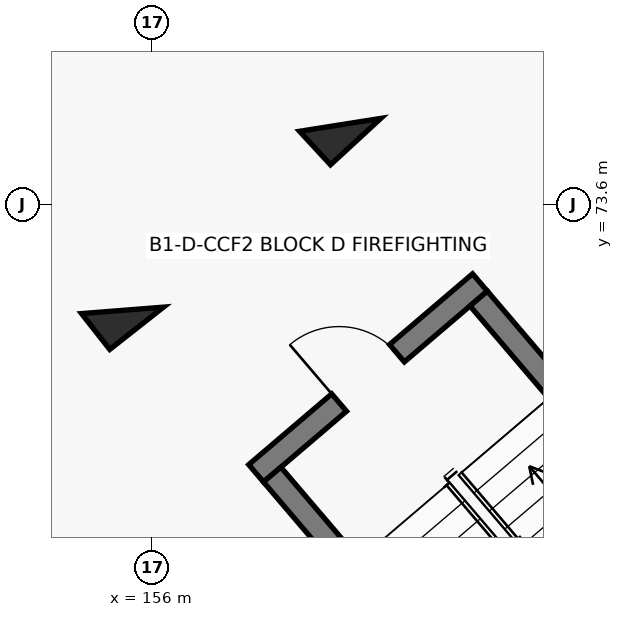
"""IFC4 building model, lengths in metres.
Left out: names, types, materials, properties, quantities, classifications, styles, units other than length and angle.
Written with IfcOpenShell. Run it as: python <this file> out.ifc"""

import sys

from ifc_helpers import new_model, si_unit, direction, frame, frame_2d, origin, origin_2d, place, context, subcontext, project, spatial, rectangle, extrude, element, fill, save


model = new_model("IFC4")
c1 = context("Model", 3, precision=1e-05, world=origin(), true_north=direction((0.0, 1.0)))
c2 = subcontext(c1, "Body", "Model", "MODEL_VIEW")
j1 = project(units=[si_unit("LENGTHUNIT", "METRE"), si_unit("PLANEANGLEUNIT", "RADIAN")], contexts=[c1])
p1 = place(None, origin())
s1 = spatial("IfcSite", under=j1, at=p1, CompositionType="ELEMENT")
p2 = place(p1, origin())
s2 = spatial("IfcBuilding", under=s1, at=p2, CompositionType="ELEMENT")
p3 = place(p2, frame((0.0, 0.0, -3.6)))
s3 = spatial("IfcBuildingStorey", under=s2, at=p3, CompositionType="ELEMENT", Elevation=-3.6)
for number, where, z_axis, x_axis in (
    (1, (155.614, 72.202, 0.0), (0.0, 0.0, 1.0), (0.618, -0.786, 0.0)),
    (2, (158.477, 74.643, 0.0), (0.0, 0.0, 1.0), (0.678, -0.735, 0.0)),
):
    element("IfcColumn", number, at=place(p3, frame(where, z_axis=z_axis, x_axis=x_axis)), inside=s3, PredefinedType="COLUMN", context=c2, shape_type="SweptSolid", body=[
        extrude(rectangle(XDim=0.6, YDim=0.9, at=origin_2d()), origin(), (0.0, 0.0, 1.0), 3.6),
    ])
p4 = place(p3, frame((157.372, 70.058, 0.0), z_axis=(0.0, 0.0, 1.0), x_axis=(0.760990583254, 0.648762924495, 0.0)))
e3 = element("IfcWall", 3, at=p4, inside=s3, PredefinedType="SHEAR", context=c2, shape_type="SweptSolid", body=[
    extrude(rectangle(XDim=3.87, YDim=0.3, at=frame_2d((1.935, 0.0))), origin(), (0.0, 0.0, 1.0), 3.6),
])
p5 = place(p4, frame((1.435, 0.0, 0.0)))
e4 = element("IfcOpeningElement", 4, at=p5, cuts=e3, PredefinedType="OPENING", context=c2, shape_type="SweptSolid", body=[
    extrude(rectangle(XDim=1.0, YDim=2.15, at=frame_2d((0.5, 1.075))), frame((0.0, 0.16, 0.0), z_axis=(0.0, -1.0, 0.0), x_axis=(1.0, 0.0, 0.0)), (0.0, 0.0, 1.0), 0.32),
])
p6 = place(p3, frame((157.583, 70.041, 0.0), z_axis=(0.0, 0.0, 1.0), x_axis=(0.648762810187, -0.760990680704, 0.0)))
e5 = element("IfcWall", 5, at=p6, inside=s3, PredefinedType="SHEAR", context=c2, shape_type="SweptSolid", body=[
    extrude(rectangle(XDim=7.69, YDim=0.3, at=frame_2d((3.845, 0.0))), origin(), (0.0, 0.0, 1.0), 3.6),
])
p7 = place(p3, frame((160.3, 72.357, 0.0), z_axis=(0.0, 0.0, 1.0), x_axis=(0.648781194888, -0.760975006922, 0.0)))
e6 = element("IfcWall", 6, at=p7, inside=s3, PredefinedType="SHEAR", context=c2, shape_type="SweptSolid", body=[
    extrude(rectangle(XDim=7.69, YDim=0.3, at=frame_2d((3.845, 0.0))), origin(), (0.0, 0.0, 1.0), 3.6),
])
p8 = place(p5, origin())
e7 = element("IfcDoor", 7, at=p8, inside=s3, OperationType="SINGLE_SWING_LEFT", PredefinedType="DOOR", context=c2, shape_type="SweptSolid", body=[
    extrude(rectangle(XDim=1.0, YDim=2.15, at=frame_2d((0.5, 1.075))), frame((0.0, 0.025, 0.0), z_axis=(0.0, -1.0, 0.0), x_axis=(1.0, 0.0, 0.0)), (0.0, 0.0, 1.0), 0.05),
])
fill(e4, e7)
save(model, sys.argv[1])
